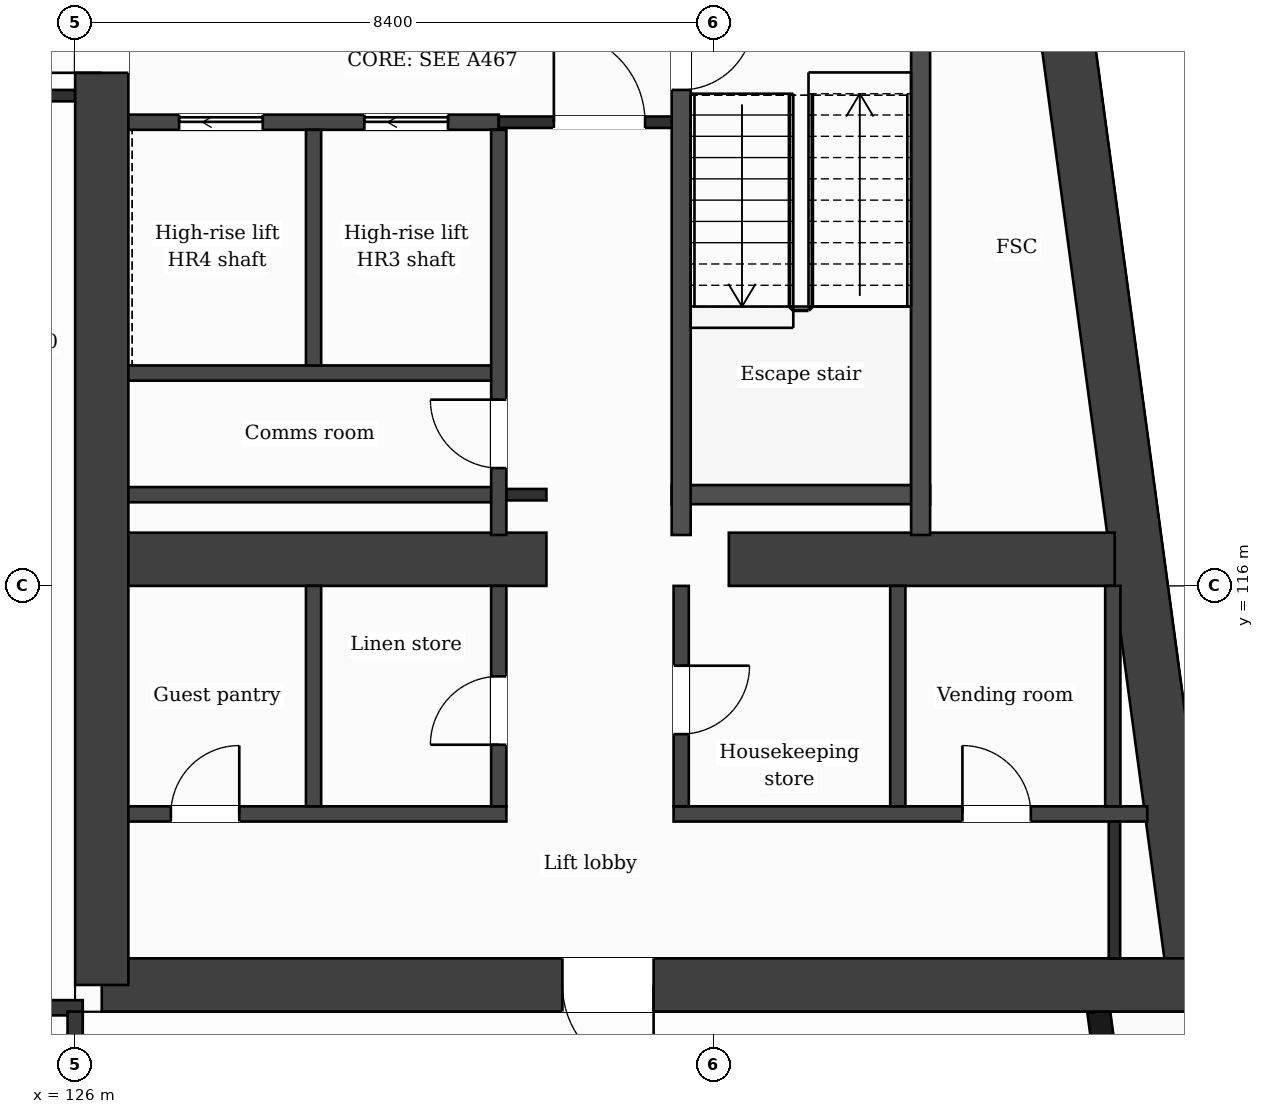
"""IFC4 building model, lengths in metres.
Left out: names, types, materials, properties, quantities, classifications, styles, units other than length and angle.
Written with IfcOpenShell. Run it as: python <this file> out.ifc"""

import sys

from ifc_helpers import new_model, si_unit, direction, frame, frame_2d, origin, place, context, subcontext, project, spatial, rectangle, extrude, element, fill, save


model = new_model("IFC4")
c1 = context("Model", 3, precision=1e-05, world=origin(), true_north=direction((0.0, 1.0)))
c2 = subcontext(c1, "Body", "Model", "MODEL_VIEW")
j1 = project(units=[si_unit("LENGTHUNIT", "METRE"), si_unit("PLANEANGLEUNIT", "RADIAN")], contexts=[c1])
p1 = place(None, origin())
s1 = spatial("IfcSite", under=j1, at=p1, CompositionType="ELEMENT")
p2 = place(p1, origin())
s2 = spatial("IfcBuilding", under=s1, at=p2, CompositionType="ELEMENT")
p3 = place(p2, frame((0.0, 0.0, 273.8)))
s3 = spatial("IfcBuildingStorey", under=s2, at=p3, CompositionType="ELEMENT", Elevation=273.8)
p4 = place(p3, frame((137.863, 132.05, 0.0), z_axis=(0.0, 0.0, 1.0), x_axis=(0.133406218907, -0.991061441464, 0.0)))
e1 = element("IfcWall", 1, at=p4, inside=s3, PredefinedType="SHEAR", context=c2, shape_type="SweptSolid", body=[
    extrude(rectangle(XDim=21.492, YDim=0.7, at=frame_2d((10.746, 0.0))), origin(), (0.0, 0.0, 1.0), 3.7),
])
p5 = place(p3, frame((140.73, 110.75, 0.0), z_axis=(0.0, 0.0, 1.0), x_axis=(-1.0, 0.0, 0.0)))
e2 = element("IfcWall", 2, at=p5, inside=s3, PredefinedType="SHEAR", context=c2, shape_type="SweptSolid", body=[
    extrude(rectangle(XDim=14.38, YDim=0.7, at=frame_2d((7.19, 0.0))), origin(), (0.0, 0.0, 1.0), 3.7),
])
p6 = place(p5, frame((7.12, 0.0, 0.0)))
e3 = element("IfcOpeningElement", 3, at=p6, cuts=e2, PredefinedType="OPENING", context=c2, shape_type="SweptSolid", body=[
    extrude(rectangle(XDim=1.2, YDim=2.1, at=frame_2d((0.6, 1.05))), frame((0.0, 0.36, 0.0), z_axis=(0.0, -1.0, 0.0), x_axis=(1.0, 0.0, 0.0)), (0.0, 0.0, 1.0), 0.72),
])
p7 = place(p3, frame((126.35, 110.75, 0.0), z_axis=(0.0, 0.0, 1.0), x_axis=(0.0, 1.0, 0.0)))
e4 = element("IfcWall", 4, at=p7, inside=s3, PredefinedType="SHEAR", context=c2, shape_type="SweptSolid", body=[
    extrude(rectangle(XDim=21.3, YDim=0.7, at=frame_2d((10.65, 0.0))), origin(), (0.0, 0.0, 1.0), 3.7),
])
p8 = place(p7, frame((12.0, 0.0, 0.0)))
e5 = element("IfcOpeningElement", 5, at=p8, cuts=e4, PredefinedType="OPENING", context=c2, shape_type="SweptSolid", body=[
    extrude(rectangle(XDim=1.4, YDim=2.1, at=frame_2d((0.7, 1.05))), frame((0.0, 0.36, 0.0), z_axis=(0.0, -1.0, 0.0), x_axis=(1.0, 0.0, 0.0)), (0.0, 0.0, 1.0), 0.72),
])
p9 = place(p3, frame((126.7, 116.35, 0.0), z_axis=(0.0, 0.0, 1.0), x_axis=(1.0, 0.0, 0.0)))
e6 = element("IfcWall", 6, at=p9, inside=s3, PredefinedType="SHEAR", context=c2, shape_type="SweptSolid", body=[
    extrude(rectangle(XDim=5.5, YDim=0.7, at=frame_2d((2.75, 0.0))), origin(), (0.0, 0.0, 1.0), 3.7),
])
p10 = place(p3, frame((134.6, 116.35, 0.0), z_axis=(0.0, 0.0, 1.0), x_axis=(1.0, 0.0, 0.0)))
e7 = element("IfcWall", 7, at=p10, inside=s3, PredefinedType="SHEAR", context=c2, shape_type="SweptSolid", body=[
    extrude(rectangle(XDim=5.077, YDim=0.7, at=frame_2d((2.539, 0.0))), origin(), (0.0, 0.0, 1.0), 3.7),
])
p11 = place(p3, frame((139.701, 108.65, 0.0), z_axis=(0.0, 0.0, 1.0), x_axis=(-0.133422458344, 0.991059255347, 0.0)))
e8 = element("IfcWall", 8, at=p11, inside=s3, PredefinedType="SOLIDWALL", context=c2, shape_type="SweptSolid", body=[
    extrude(rectangle(XDim=1.766, YDim=0.3, at=frame_2d((0.883, 0.0))), origin(), (0.0, 0.0, 1.0), 3.38),
])
p12 = place(p3, frame((100.7, 110.45, 0.0), z_axis=(0.0, 0.0, 1.0), x_axis=(1.0, 0.0, 0.0)))
e9 = element("IfcWall", 9, at=p12, inside=s3, PredefinedType="PARTITIONING", context=c2, shape_type="SweptSolid", body=[
    extrude(rectangle(XDim=25.4, YDim=0.2, at=frame_2d((12.7, 0.0))), origin(), (0.0, 0.0, 1.0), 3.38),
])
p13 = place(p3, frame((126.7, 113.0, 0.0), z_axis=(0.0, 0.0, 1.0), x_axis=(1.0, 0.0, 0.0)))
e10 = element("IfcWall", 10, at=p13, inside=s3, PredefinedType="PARTITIONING", context=c2, shape_type="SweptSolid", body=[
    extrude(rectangle(XDim=4.973, YDim=0.2, at=frame_2d((2.487, 0.0))), origin(), (0.0, 0.0, 1.0), 3.38),
])
p14 = place(p13, frame((0.559, 0.0, 0.0)))
e11 = element("IfcOpeningElement", 11, at=p14, cuts=e10, PredefinedType="OPENING", context=c2, shape_type="SweptSolid", body=[
    extrude(rectangle(XDim=0.9, YDim=2.1, at=frame_2d((0.45, 1.05))), frame((0.0, 0.11, 0.0), z_axis=(0.0, -1.0, 0.0), x_axis=(1.0, 0.0, 0.0)), (0.0, 0.0, 1.0), 0.22),
])
p15 = place(p3, frame((133.873, 113.0, 0.0), z_axis=(0.0, 0.0, 1.0), x_axis=(1.0, 0.0, 0.0)))
e12 = element("IfcWall", 12, at=p15, inside=s3, PredefinedType="PARTITIONING", context=c2, shape_type="SweptSolid", body=[
    extrude(rectangle(XDim=6.231, YDim=0.2, at=frame_2d((3.116, 0.0))), origin(), (0.0, 0.0, 1.0), 3.38),
])
p16 = place(p15, frame((3.8, 0.0, 0.0)))
e13 = element("IfcOpeningElement", 13, at=p16, cuts=e12, PredefinedType="OPENING", context=c2, shape_type="SweptSolid", body=[
    extrude(rectangle(XDim=0.9, YDim=2.1, at=frame_2d((0.45, 1.05))), frame((0.0, 0.11, 0.0), z_axis=(0.0, -1.0, 0.0), x_axis=(1.0, 0.0, 0.0)), (0.0, 0.0, 1.0), 0.22),
])
p17 = place(p3, frame((126.7, 117.2, 0.0), z_axis=(0.0, 0.0, 1.0), x_axis=(1.0, 0.0, 0.0)))
e14 = element("IfcWall", 14, at=p17, inside=s3, PredefinedType="PARTITIONING", context=c2, shape_type="SweptSolid", body=[
    extrude(rectangle(XDim=4.873, YDim=0.2, at=frame_2d((2.437, 0.0))), origin(), (0.0, 0.0, 1.0), 3.38),
])
p18 = place(p3, frame((131.573, 117.2, 0.0), z_axis=(0.0, 0.0, 1.0), x_axis=(1.0, 0.0, 0.0)))
e15 = element("IfcWall", 15, at=p18, inside=s3, PredefinedType="PARTITIONING", context=c2, shape_type="SweptSolid", body=[
    extrude(rectangle(XDim=0.627, YDim=0.15, at=frame_2d((0.313, 0.0))), origin(), (0.0, 0.0, 1.0), 3.38),
])
p19 = place(p3, frame((133.848, 117.2, 0.0), z_axis=(0.0, 0.0, 1.0), x_axis=(1.0, 0.0, 0.0)))
e16 = element("IfcWall", 16, at=p19, inside=s3, PredefinedType="PARTITIONING", context=c2, shape_type="SweptSolid", body=[
    extrude(rectangle(XDim=3.4, YDim=0.25, at=frame_2d((1.7, 0.0))), origin(), (0.0, 0.0, 1.0), 3.38),
])
p20 = place(p3, frame((126.7, 118.8, 0.0), z_axis=(0.0, 0.0, 1.0), x_axis=(1.0, 0.0, 0.0)))
e17 = element("IfcWall", 17, at=p20, inside=s3, PredefinedType="PARTITIONING", context=c2, shape_type="SweptSolid", body=[
    extrude(rectangle(XDim=4.873, YDim=0.2, at=frame_2d((2.437, 0.0))), origin(), (0.0, 0.0, 1.0), 3.38),
])
p21 = place(p3, frame((126.7, 122.1, 0.0), z_axis=(0.0, 0.0, 1.0), x_axis=(1.0, 0.0, 0.0)))
e18 = element("IfcWall", 18, at=p21, inside=s3, PredefinedType="PARTITIONING", context=c2, shape_type="SweptSolid", body=[
    extrude(rectangle(XDim=4.873, YDim=0.2, at=frame_2d((2.437, 0.0))), origin(), (0.0, 0.0, 1.0), 3.38),
])
p22 = place(p21, frame((3.105, 0.0, 0.0)))
e19 = element("IfcOpeningElement", 19, at=p22, cuts=e18, PredefinedType="OPENING", context=c2, shape_type="SweptSolid", body=[
    extrude(rectangle(XDim=1.1, YDim=2.1, at=frame_2d((0.55, 1.05))), frame((0.0, 0.11, 0.0), z_axis=(0.0, -1.0, 0.0), x_axis=(1.0, 0.0, 0.0)), (0.0, 0.0, 1.0), 0.22),
])
p23 = place(p21, frame((0.668, 0.0, 0.0)))
e20 = element("IfcOpeningElement", 20, at=p23, cuts=e18, PredefinedType="OPENING", context=c2, shape_type="SweptSolid", body=[
    extrude(rectangle(XDim=1.1, YDim=2.1, at=frame_2d((0.55, 1.05))), frame((0.0, 0.11, 0.0), z_axis=(0.0, -1.0, 0.0), x_axis=(1.0, 0.0, 0.0)), (0.0, 0.0, 1.0), 0.22),
])
p24 = place(p3, frame((131.573, 122.1, 0.0), z_axis=(0.0, 0.0, 1.0), x_axis=(1.0, 0.0, 0.0)))
e21 = element("IfcWall", 21, at=p24, inside=s3, PredefinedType="PARTITIONING", context=c2, shape_type="SweptSolid", body=[
    extrude(rectangle(XDim=2.4, YDim=0.15, at=frame_2d((1.2, 0.0))), origin(), (0.0, 0.0, 1.0), 3.38),
])
p25 = place(p24, frame((0.725, 0.0, 0.0)))
e22 = element("IfcOpeningElement", 22, at=p25, cuts=e21, PredefinedType="OPENING", context=c2, shape_type="SweptSolid", body=[
    extrude(rectangle(XDim=1.2, YDim=2.1, at=frame_2d((0.6, 1.05))), frame((0.0, 0.085, 0.0), z_axis=(0.0, -1.0, 0.0), x_axis=(1.0, 0.0, 0.0)), (0.0, 0.0, 1.0), 0.17),
])
p26 = place(p3, frame((100.8, 122.45, 0.0), z_axis=(0.0, 0.0, 1.0), x_axis=(1.0, 0.0, 0.0)))
e23 = element("IfcWall", 23, at=p26, inside=s3, PredefinedType="PARTITIONING", context=c2, shape_type="SweptSolid", body=[
    extrude(rectangle(XDim=25.2, YDim=0.15, at=frame_2d((12.6, 0.0))), origin(), (0.0, 0.0, 1.0), 3.38),
])
p27 = place(p26, frame((5.55, 0.0, 0.0)))
e24 = element("IfcOpeningElement", 24, at=p27, cuts=e23, PredefinedType="OPENING", context=c2, shape_type="SweptSolid", body=[
    extrude(rectangle(XDim=1.0, YDim=2.1, at=frame_2d((0.5, 1.05))), frame((0.0, 0.085, 0.0), z_axis=(0.0, -1.0, 0.0), x_axis=(1.0, 0.0, 0.0)), (0.0, 0.0, 1.0), 0.17),
])
p28 = place(p26, frame((8.862, 0.0, 0.0)))
e25 = element("IfcOpeningElement", 25, at=p28, cuts=e23, PredefinedType="OPENING", context=c2, shape_type="SweptSolid", body=[
    extrude(rectangle(XDim=0.95, YDim=2.1, at=frame_2d((0.475, 1.05))), frame((0.0, 0.085, 0.0), z_axis=(0.0, -1.0, 0.0), x_axis=(1.0, 0.0, 0.0)), (0.0, 0.0, 1.0), 0.17),
])
p29 = place(p26, frame((15.2, 0.0, 0.0)))
e26 = element("IfcOpeningElement", 26, at=p29, cuts=e23, PredefinedType="OPENING", context=c2, shape_type="SweptSolid", body=[
    extrude(rectangle(XDim=0.95, YDim=2.1, at=frame_2d((0.475, 1.05))), frame((0.0, 0.085, 0.0), z_axis=(0.0, -1.0, 0.0), x_axis=(1.0, 0.0, 0.0)), (0.0, 0.0, 1.0), 0.17),
])
p30 = place(p26, frame((17.325, 0.0, 0.0)))
e27 = element("IfcOpeningElement", 27, at=p30, cuts=e23, PredefinedType="OPENING", context=c2, shape_type="SweptSolid", body=[
    extrude(rectangle(XDim=1.0, YDim=2.1, at=frame_2d((0.5, 1.05))), frame((0.0, 0.085, 0.0), z_axis=(0.0, -1.0, 0.0), x_axis=(1.0, 0.0, 0.0)), (0.0, 0.0, 1.0), 0.17),
])
p31 = place(p26, frame((23.862, 0.0, 0.0)))
e28 = element("IfcOpeningElement", 28, at=p31, cuts=e23, PredefinedType="OPENING", context=c2, shape_type="SweptSolid", body=[
    extrude(rectangle(XDim=0.95, YDim=2.1, at=frame_2d((0.475, 1.05))), frame((0.0, 0.085, 0.0), z_axis=(0.0, -1.0, 0.0), x_axis=(1.0, 0.0, 0.0)), (0.0, 0.0, 1.0), 0.17),
])
p32 = place(p3, frame((126.0, 108.79, 0.0), z_axis=(0.0, 0.0, 1.0), x_axis=(0.0, 1.0, 0.0)))
e29 = element("IfcWall", 29, at=p32, inside=s3, PredefinedType="PARTITIONING", context=c2, shape_type="SweptSolid", body=[
    extrude(rectangle(XDim=1.61, YDim=0.2, at=frame_2d((0.805, 0.0))), origin(), (0.0, 0.0, 1.0), 3.38),
])
p33 = place(p3, frame((129.136, 113.1, 0.0), z_axis=(0.0, 0.0, 1.0), x_axis=(0.0, 1.0, 0.0)))
e30 = element("IfcWall", 30, at=p33, inside=s3, PredefinedType="PARTITIONING", context=c2, shape_type="SweptSolid", body=[
    extrude(rectangle(XDim=2.9, YDim=0.2, at=frame_2d((1.45, 0.0))), origin(), (0.0, 0.0, 1.0), 3.38),
])
p34 = place(p3, frame((129.136, 118.9, 0.0), z_axis=(0.0, 0.0, 1.0), x_axis=(0.0, 1.0, 0.0)))
e31 = element("IfcWall", 31, at=p34, inside=s3, PredefinedType="PARTITIONING", context=c2, shape_type="SweptSolid", body=[
    extrude(rectangle(XDim=3.1, YDim=0.2, at=frame_2d((1.55, 0.0))), origin(), (0.0, 0.0, 1.0), 3.38),
])
p35 = place(p3, frame((131.573, 113.1, 0.0), z_axis=(0.0, 0.0, 1.0), x_axis=(0.0, 1.0, 0.0)))
e32 = element("IfcWall", 32, at=p35, inside=s3, PredefinedType="PARTITIONING", context=c2, shape_type="SweptSolid", body=[
    extrude(rectangle(XDim=2.9, YDim=0.2, at=frame_2d((1.45, 0.0))), origin(), (0.0, 0.0, 1.0), 3.38),
])
p36 = place(p35, frame((0.81, 0.0, 0.0)))
e33 = element("IfcOpeningElement", 33, at=p36, cuts=e32, PredefinedType="OPENING", context=c2, shape_type="SweptSolid", body=[
    extrude(rectangle(XDim=0.9, YDim=2.1, at=frame_2d((0.45, 1.05))), frame((0.0, 0.11, 0.0), z_axis=(0.0, -1.0, 0.0), x_axis=(1.0, 0.0, 0.0)), (0.0, 0.0, 1.0), 0.22),
])
p37 = place(p3, frame((131.573, 116.67, 0.0), z_axis=(0.0, 0.0, 1.0), x_axis=(0.0, 1.0, 0.0)))
e34 = element("IfcWall", 34, at=p37, inside=s3, PredefinedType="PARTITIONING", context=c2, shape_type="SweptSolid", body=[
    extrude(rectangle(XDim=5.33, YDim=0.2, at=frame_2d((2.665, 0.0))), origin(), (0.0, 0.0, 1.0), 3.38),
])
p38 = place(p37, frame((0.88, 0.0, 0.0)))
e35 = element("IfcOpeningElement", 35, at=p38, cuts=e34, PredefinedType="OPENING", context=c2, shape_type="SweptSolid", body=[
    extrude(rectangle(XDim=0.9, YDim=2.1, at=frame_2d((0.45, 1.05))), frame((0.0, 0.11, 0.0), z_axis=(0.0, -1.0, 0.0), x_axis=(1.0, 0.0, 0.0)), (0.0, 0.0, 1.0), 0.22),
])
p39 = place(p3, frame((133.973, 113.1, 0.0), z_axis=(0.0, 0.0, 1.0), x_axis=(0.0, 1.0, 0.0)))
e36 = element("IfcWall", 36, at=p39, inside=s3, PredefinedType="PARTITIONING", context=c2, shape_type="SweptSolid", body=[
    extrude(rectangle(XDim=2.9, YDim=0.2, at=frame_2d((1.45, 0.0))), origin(), (0.0, 0.0, 1.0), 3.38),
])
p40 = place(p39, frame((0.95, 0.0, 0.0)))
e37 = element("IfcOpeningElement", 37, at=p40, cuts=e36, PredefinedType="OPENING", context=c2, shape_type="SweptSolid", body=[
    extrude(rectangle(XDim=0.9, YDim=2.1, at=frame_2d((0.45, 1.05))), frame((0.0, 0.11, 0.0), z_axis=(0.0, -1.0, 0.0), x_axis=(1.0, 0.0, 0.0)), (0.0, 0.0, 1.0), 0.22),
])
p41 = place(p3, frame((133.973, 116.67, 0.0), z_axis=(0.0, 0.0, 1.0), x_axis=(0.0, 1.0, 0.0)))
e38 = element("IfcWall", 38, at=p41, inside=s3, PredefinedType="PARTITIONING", context=c2, shape_type="SweptSolid", body=[
    extrude(rectangle(XDim=7.155, YDim=0.25, at=frame_2d((3.578, 0.0))), origin(), (0.0, 0.0, 1.0), 3.38),
])
p42 = place(p41, frame((5.855, 0.0, 0.0)))
e39 = element("IfcOpeningElement", 39, at=p42, cuts=e38, PredefinedType="OPENING", context=c2, shape_type="SweptSolid", body=[
    extrude(rectangle(XDim=0.95, YDim=2.1, at=frame_2d((0.475, 1.05))), frame((0.0, 0.135, 0.0), z_axis=(0.0, -1.0, 0.0), x_axis=(1.0, 0.0, 0.0)), (0.0, 0.0, 1.0), 0.27),
])
p43 = place(p3, frame((136.823, 113.1, 0.0), z_axis=(0.0, 0.0, 1.0), x_axis=(0.0, 1.0, 0.0)))
e40 = element("IfcWall", 40, at=p43, inside=s3, PredefinedType="PARTITIONING", context=c2, shape_type="SweptSolid", body=[
    extrude(rectangle(XDim=2.9, YDim=0.2, at=frame_2d((1.45, 0.0))), origin(), (0.0, 0.0, 1.0), 3.38),
])
p44 = place(p3, frame((137.123, 116.67, 0.0), z_axis=(0.0, 0.0, 1.0), x_axis=(0.0, 1.0, 0.0)))
e41 = element("IfcWall", 41, at=p44, inside=s3, PredefinedType="PARTITIONING", context=c2, shape_type="SweptSolid", body=[
    extrude(rectangle(XDim=7.155, YDim=0.25, at=frame_2d((3.578, 0.0))), origin(), (0.0, 0.0, 1.0), 3.38),
])
p45 = place(p3, frame((139.652, 113.1, 0.0), z_axis=(0.0, 0.0, 1.0), x_axis=(0.0, 1.0, 0.0)))
e42 = element("IfcWall", 42, at=p45, inside=s3, PredefinedType="PARTITIONING", context=c2, shape_type="SweptSolid", body=[
    extrude(rectangle(XDim=2.9, YDim=0.2, at=frame_2d((1.45, 0.0))), origin(), (0.0, 0.0, 1.0), 3.38),
])
p46 = place(p3, frame((139.673, 111.1, 0.0), z_axis=(0.0, 0.0, 1.0), x_axis=(0.0, 1.0, 0.0)))
e43 = element("IfcWall", 43, at=p46, inside=s3, PredefinedType="PARTITIONING", context=c2, shape_type="SweptSolid", body=[
    extrude(rectangle(XDim=1.8, YDim=0.15, at=frame_2d((0.9, 0.0))), origin(), (0.0, 0.0, 1.0), 3.38),
])
p47 = place(p25, origin())
e44 = element("IfcDoor", 44, at=p47, inside=s3, OperationType="SINGLE_SWING_LEFT", PredefinedType="DOOR", context=c2, shape_type="SweptSolid", body=[
    extrude(rectangle(XDim=1.2, YDim=2.1, at=frame_2d((0.6, 1.05))), frame((0.0, 0.025, 0.0), z_axis=(0.0, -1.0, 0.0), x_axis=(1.0, 0.0, 0.0)), (0.0, 0.0, 1.0), 0.05),
])
fill(e22, e44)
p48 = place(p22, origin())
e45 = element("IfcDoor", 45, at=p48, inside=s3, OperationType="SLIDING_TO_LEFT", PredefinedType="DOOR", context=c2, shape_type="SweptSolid", body=[
    extrude(rectangle(XDim=1.1, YDim=2.1, at=frame_2d((0.55, 1.05))), frame((0.0, 0.025, 0.0), z_axis=(0.0, -1.0, 0.0), x_axis=(1.0, 0.0, 0.0)), (0.0, 0.0, 1.0), 0.05),
])
fill(e19, e45)
p49 = place(p23, origin())
e46 = element("IfcDoor", 46, at=p49, inside=s3, OperationType="SLIDING_TO_LEFT", PredefinedType="DOOR", context=c2, shape_type="SweptSolid", body=[
    extrude(rectangle(XDim=1.1, YDim=2.1, at=frame_2d((0.55, 1.05))), frame((0.0, 0.025, 0.0), z_axis=(0.0, -1.0, 0.0), x_axis=(1.0, 0.0, 0.0)), (0.0, 0.0, 1.0), 0.05),
])
fill(e20, e46)
p50 = place(p42, origin())
e47 = element("IfcDoor", 47, at=p50, inside=s3, OperationType="SINGLE_SWING_RIGHT", PredefinedType="DOOR", context=c2, shape_type="SweptSolid", body=[
    extrude(rectangle(XDim=0.95, YDim=2.1, at=frame_2d((0.475, 1.05))), frame((0.0, 0.025, 0.0), z_axis=(0.0, -1.0, 0.0), x_axis=(1.0, 0.0, 0.0)), (0.0, 0.0, 1.0), 0.05),
])
fill(e39, e47)
p51 = place(p38, origin())
e48 = element("IfcDoor", 48, at=p51, inside=s3, OperationType="SINGLE_SWING_RIGHT", PredefinedType="DOOR", context=c2, shape_type="SweptSolid", body=[
    extrude(rectangle(XDim=0.9, YDim=2.1, at=frame_2d((0.45, 1.05))), frame((0.0, 0.025, 0.0), z_axis=(0.0, -1.0, 0.0), x_axis=(1.0, 0.0, 0.0)), (0.0, 0.0, 1.0), 0.05),
])
fill(e35, e48)
p52 = place(p16, origin())
e49 = element("IfcDoor", 49, at=p52, inside=s3, OperationType="SINGLE_SWING_LEFT", PredefinedType="DOOR", context=c2, shape_type="SweptSolid", body=[
    extrude(rectangle(XDim=0.9, YDim=2.1, at=frame_2d((0.45, 1.05))), frame((0.0, 0.025, 0.0), z_axis=(0.0, -1.0, 0.0), x_axis=(1.0, 0.0, 0.0)), (0.0, 0.0, 1.0), 0.05),
])
fill(e13, e49)
p53 = place(p40, origin())
e50 = element("IfcDoor", 50, at=p53, inside=s3, OperationType="SINGLE_SWING_RIGHT", PredefinedType="DOOR", context=c2, shape_type="SweptSolid", body=[
    extrude(rectangle(XDim=0.9, YDim=2.1, at=frame_2d((0.45, 1.05))), frame((0.0, 0.025, 0.0), z_axis=(0.0, -1.0, 0.0), x_axis=(1.0, 0.0, 0.0)), (0.0, 0.0, 1.0), 0.05),
])
fill(e37, e50)
p54 = place(p36, origin())
e51 = element("IfcDoor", 51, at=p54, inside=s3, OperationType="SINGLE_SWING_LEFT", PredefinedType="DOOR", context=c2, shape_type="SweptSolid", body=[
    extrude(rectangle(XDim=0.9, YDim=2.1, at=frame_2d((0.45, 1.05))), frame((0.0, 0.025, 0.0), z_axis=(0.0, -1.0, 0.0), x_axis=(1.0, 0.0, 0.0)), (0.0, 0.0, 1.0), 0.05),
])
fill(e33, e51)
p55 = place(p14, origin())
e52 = element("IfcDoor", 52, at=p55, inside=s3, OperationType="SINGLE_SWING_RIGHT", PredefinedType="DOOR", context=c2, shape_type="SweptSolid", body=[
    extrude(rectangle(XDim=0.9, YDim=2.1, at=frame_2d((0.45, 1.05))), frame((0.0, 0.025, 0.0), z_axis=(0.0, -1.0, 0.0), x_axis=(1.0, 0.0, 0.0)), (0.0, 0.0, 1.0), 0.05),
])
fill(e11, e52)
p56 = place(p6, origin())
e53 = element("IfcDoor", 53, at=p56, inside=s3, OperationType="SINGLE_SWING_LEFT", PredefinedType="DOOR", context=c2, shape_type="SweptSolid", body=[
    extrude(rectangle(XDim=1.2, YDim=2.1, at=frame_2d((0.6, 1.05))), frame((0.0, 0.025, 0.0), z_axis=(0.0, -1.0, 0.0), x_axis=(1.0, 0.0, 0.0)), (0.0, 0.0, 1.0), 0.05),
])
fill(e3, e53)
p57 = place(p8, origin())
e54 = element("IfcDoor", 54, at=p57, inside=s3, OperationType="SINGLE_SWING_LEFT", PredefinedType="DOOR", context=c2, shape_type="SweptSolid", body=[
    extrude(rectangle(XDim=1.4, YDim=2.1, at=frame_2d((0.7, 1.05))), frame((0.0, 0.025, 0.0), z_axis=(0.0, -1.0, 0.0), x_axis=(1.0, 0.0, 0.0)), (0.0, 0.0, 1.0), 0.05),
])
fill(e5, e54)
save(model, sys.argv[1])
